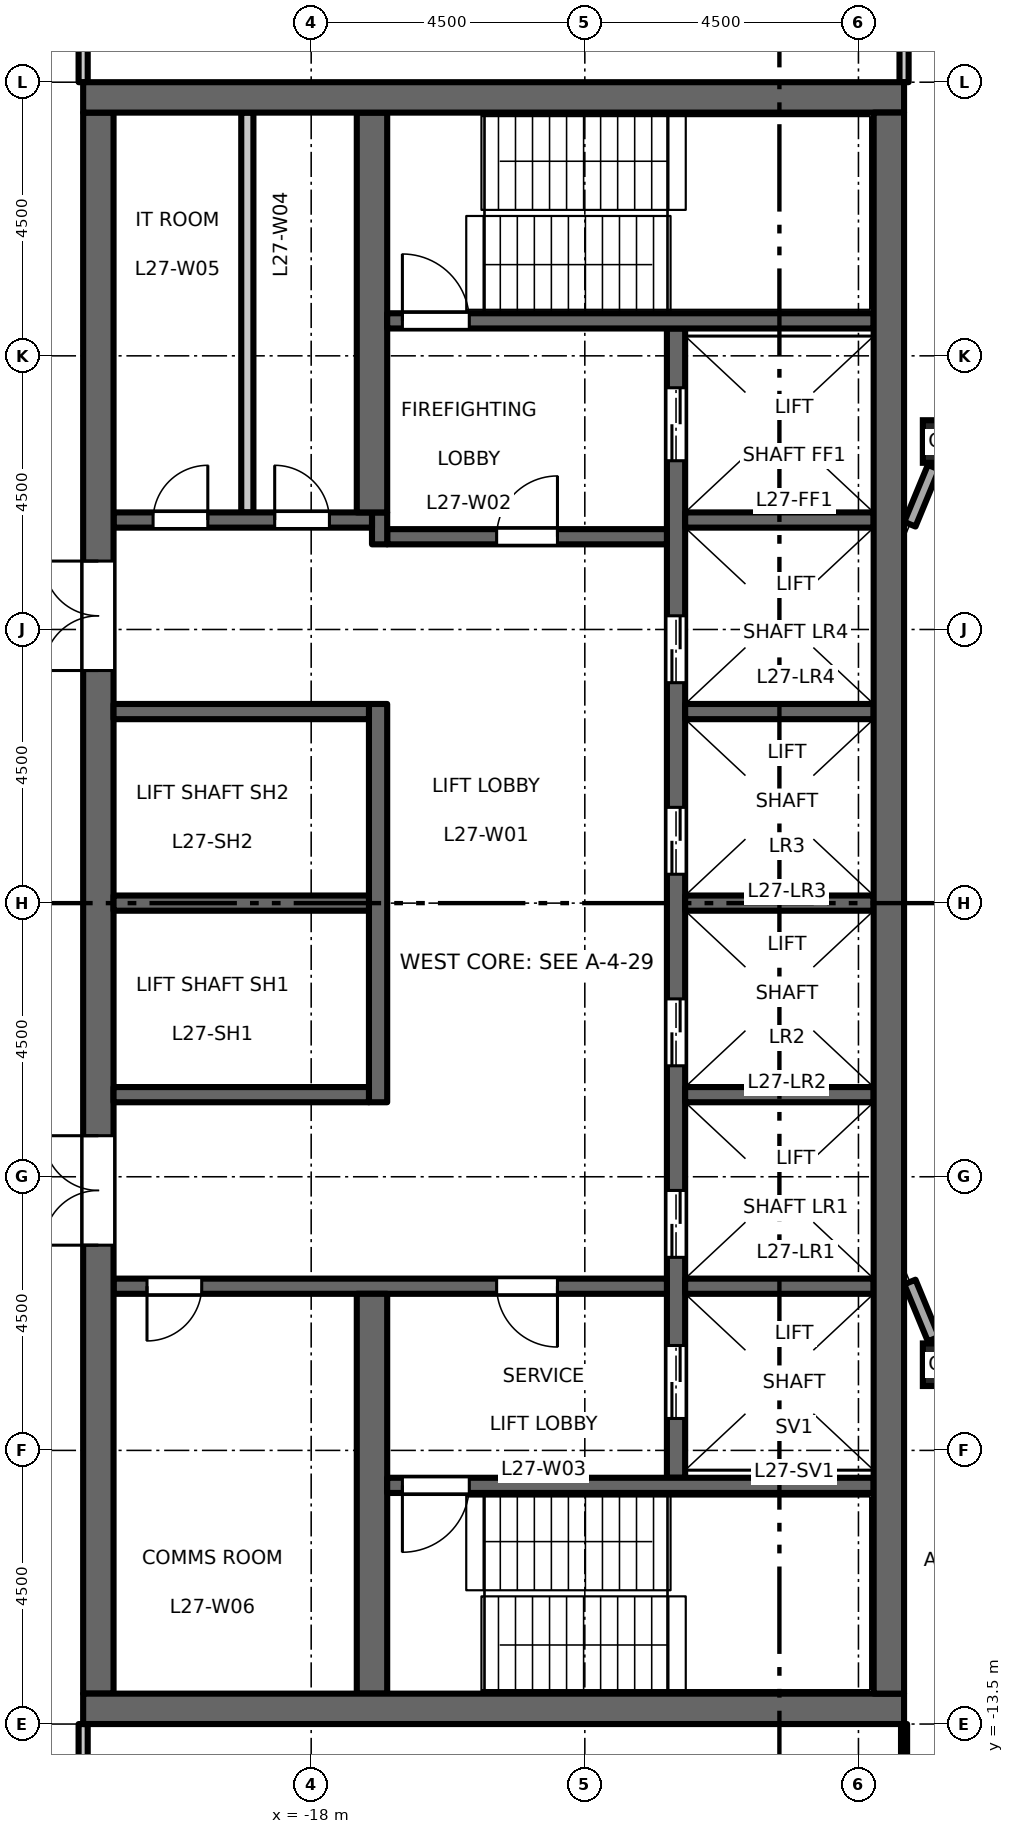
"""IFC4 building model, lengths in metres.
Left out: names, types, materials, properties, quantities, classifications, styles, units other than length and angle.
Written with IfcOpenShell. Run it as: python <this file> out.ifc"""

import sys

from ifc_helpers import new_model, si_unit, direction, frame, frame_2d, origin, origin_2d, place, context, subcontext, project, spatial, rectangle, hollow_rectangle, extrude, element, fill, save


model = new_model("IFC4")
c1 = context("Model", 3, precision=1e-05, world=origin(), true_north=direction((0.0, 1.0)))
c2 = subcontext(c1, "Body", "Model", "MODEL_VIEW")
j1 = project(units=[si_unit("LENGTHUNIT", "METRE"), si_unit("PLANEANGLEUNIT", "RADIAN")], contexts=[c1])
p1 = place(None, origin())
s1 = spatial("IfcSite", under=j1, at=p1, CompositionType="ELEMENT")
p2 = place(p1, origin())
s2 = spatial("IfcBuilding", under=s1, at=p2, CompositionType="ELEMENT")
p3 = place(p2, frame((0.0, 0.0, 127.2)))
s3 = spatial("IfcBuildingStorey", under=s2, at=p3, CompositionType="ELEMENT", Elevation=127.2)
for number, where, z_axis, x_axis in (
    (1, (-7.591, -7.591, 0.0), (0.0, 0.0, 1.0), (1.0, 0.0, 0.0)),
    (2, (-7.591, 7.591, 0.0), (0.0, 0.0, 1.0), (1.0, 0.0, 0.0)),
):
    element("IfcColumn", number, at=place(p3, frame(where, z_axis=z_axis, x_axis=x_axis)), inside=s3, PredefinedType="COLUMN", context=c2, shape_type="SweptSolid", body=[
        extrude(hollow_rectangle(XDim=0.7, YDim=0.7, WallThickness=0.04, at=origin_2d()), origin(), (0.0, 0.0, 1.0), 4.5),
    ])
p4 = place(p3, frame((-12.0, -9.45, 0.0), z_axis=(0.0, 0.0, 1.0), x_axis=(0.0, 1.0, 0.0)))
e3 = element("IfcWall", 3, at=p4, inside=s3, PredefinedType="SHEAR", context=c2, shape_type="SweptSolid", body=[
    extrude(rectangle(XDim=18.9, YDim=0.3, at=frame_2d((9.45, 0.0))), origin(), (0.0, 0.0, 1.0), 4.35),
])
p5 = place(p4, frame((3.625, 0.0, 0.0)))
e4 = element("IfcOpeningElement", 4, at=p5, cuts=e3, PredefinedType="OPENING", context=c2, shape_type="SweptSolid", body=[
    extrude(rectangle(XDim=1.1, YDim=2.1, at=frame_2d((0.55, 1.05))), frame((0.0, 0.16, 0.0), z_axis=(0.0, -1.0, 0.0), x_axis=(1.0, 0.0, 0.0)), (0.0, 0.0, 1.0), 0.32),
])
p6 = place(p4, frame((6.775, 0.0, 0.0)))
e5 = element("IfcOpeningElement", 5, at=p6, cuts=e3, PredefinedType="OPENING", context=c2, shape_type="SweptSolid", body=[
    extrude(rectangle(XDim=1.1, YDim=2.1, at=frame_2d((0.55, 1.05))), frame((0.0, 0.16, 0.0), z_axis=(0.0, -1.0, 0.0), x_axis=(1.0, 0.0, 0.0)), (0.0, 0.0, 1.0), 0.32),
])
p7 = place(p4, frame((9.925, 0.0, 0.0)))
e6 = element("IfcOpeningElement", 6, at=p7, cuts=e3, PredefinedType="OPENING", context=c2, shape_type="SweptSolid", body=[
    extrude(rectangle(XDim=1.1, YDim=2.1, at=frame_2d((0.55, 1.05))), frame((0.0, 0.16, 0.0), z_axis=(0.0, -1.0, 0.0), x_axis=(1.0, 0.0, 0.0)), (0.0, 0.0, 1.0), 0.32),
])
p8 = place(p4, frame((13.075, 0.0, 0.0)))
e7 = element("IfcOpeningElement", 7, at=p8, cuts=e3, PredefinedType="OPENING", context=c2, shape_type="SweptSolid", body=[
    extrude(rectangle(XDim=1.1, YDim=2.1, at=frame_2d((0.55, 1.05))), frame((0.0, 0.16, 0.0), z_axis=(0.0, -1.0, 0.0), x_axis=(1.0, 0.0, 0.0)), (0.0, 0.0, 1.0), 0.32),
])
p9 = place(p4, frame((16.725, 0.0, 0.0)))
e8 = element("IfcOpeningElement", 8, at=p9, cuts=e3, PredefinedType="OPENING", context=c2, shape_type="SweptSolid", body=[
    extrude(rectangle(XDim=1.2, YDim=2.1, at=frame_2d((0.6, 1.05))), frame((0.0, 0.16, 0.0), z_axis=(0.0, -1.0, 0.0), x_axis=(1.0, 0.0, 0.0)), (0.0, 0.0, 1.0), 0.32),
])
p10 = place(p4, frame((0.975, 0.0, 0.0)))
e9 = element("IfcOpeningElement", 9, at=p10, cuts=e3, PredefinedType="OPENING", context=c2, shape_type="SweptSolid", body=[
    extrude(rectangle(XDim=1.2, YDim=2.1, at=frame_2d((0.6, 1.05))), frame((0.0, 0.16, 0.0), z_axis=(0.0, -1.0, 0.0), x_axis=(1.0, 0.0, 0.0)), (0.0, 0.0, 1.0), 0.32),
])
p11 = place(p3, frame((-12.15, 6.025, 0.0), z_axis=(0.0, 0.0, 1.0), x_axis=(-1.0, 0.0, 0.0)))
e10 = element("IfcWall", 10, at=p11, inside=s3, PredefinedType="SHEAR", context=c2, shape_type="SweptSolid", body=[
    extrude(rectangle(XDim=4.6, YDim=0.25, at=frame_2d((2.3, 0.0))), origin(), (0.0, 0.0, 1.0), 4.35),
])
p12 = place(p11, frame((1.8, 0.0, 0.0)))
e11 = element("IfcOpeningElement", 11, at=p12, cuts=e10, PredefinedType="OPENING", context=c2, shape_type="SweptSolid", body=[
    extrude(rectangle(XDim=1.0, YDim=2.1, at=frame_2d((0.5, 1.05))), frame((0.0, 0.135, 0.0), z_axis=(0.0, -1.0, 0.0), x_axis=(1.0, 0.0, 0.0)), (0.0, 0.0, 1.0), 0.27),
])
p13 = place(p3, frame((-16.875, 5.9, 0.0), z_axis=(0.0, 0.0, 1.0), x_axis=(0.0, 1.0, 0.0)))
e12 = element("IfcWall", 12, at=p13, inside=s3, PredefinedType="SHEAR", context=c2, shape_type="SweptSolid", body=[
    extrude(rectangle(XDim=0.525, YDim=0.25, at=frame_2d((0.263, 0.0))), origin(), (0.0, 0.0, 1.0), 4.35),
])
p14 = place(p3, frame((-17.0, 6.3, 0.0), z_axis=(0.0, 0.0, 1.0), x_axis=(-1.0, 0.0, 0.0)))
e13 = element("IfcWall", 13, at=p14, inside=s3, PredefinedType="SHEAR", context=c2, shape_type="SweptSolid", body=[
    extrude(rectangle(XDim=4.25, YDim=0.25, at=frame_2d((2.125, 0.0))), origin(), (0.0, 0.0, 1.0), 4.35),
])
p15 = place(p14, frame((0.7, 0.0, 0.0)))
e14 = element("IfcOpeningElement", 14, at=p15, cuts=e13, PredefinedType="OPENING", context=c2, shape_type="SweptSolid", body=[
    extrude(rectangle(XDim=0.9, YDim=2.1, at=frame_2d((0.45, 1.05))), frame((0.0, 0.135, 0.0), z_axis=(0.0, -1.0, 0.0), x_axis=(1.0, 0.0, 0.0)), (0.0, 0.0, 1.0), 0.27),
])
p16 = place(p14, frame((2.7, 0.0, 0.0)))
e15 = element("IfcOpeningElement", 15, at=p16, cuts=e13, PredefinedType="OPENING", context=c2, shape_type="SweptSolid", body=[
    extrude(rectangle(XDim=0.9, YDim=2.1, at=frame_2d((0.45, 1.05))), frame((0.0, 0.135, 0.0), z_axis=(0.0, -1.0, 0.0), x_axis=(1.0, 0.0, 0.0)), (0.0, 0.0, 1.0), 0.27),
])
p17 = place(p3, frame((-12.15, -6.3, 0.0), z_axis=(0.0, 0.0, 1.0), x_axis=(-1.0, 0.0, 0.0)))
e16 = element("IfcWall", 16, at=p17, inside=s3, PredefinedType="SHEAR", context=c2, shape_type="SweptSolid", body=[
    extrude(rectangle(XDim=9.1, YDim=0.25, at=frame_2d((4.55, 0.0))), origin(), (0.0, 0.0, 1.0), 4.35),
])
p18 = place(p17, frame((1.8, 0.0, 0.0)))
e17 = element("IfcOpeningElement", 17, at=p18, cuts=e16, PredefinedType="OPENING", context=c2, shape_type="SweptSolid", body=[
    extrude(rectangle(XDim=1.0, YDim=2.1, at=frame_2d((0.5, 1.05))), frame((0.0, 0.135, 0.0), z_axis=(0.0, -1.0, 0.0), x_axis=(1.0, 0.0, 0.0)), (0.0, 0.0, 1.0), 0.27),
])
p19 = place(p17, frame((7.65, 0.0, 0.0)))
e18 = element("IfcOpeningElement", 18, at=p19, cuts=e16, PredefinedType="OPENING", context=c2, shape_type="SweptSolid", body=[
    extrude(rectangle(XDim=0.9, YDim=2.1, at=frame_2d((0.45, 1.05))), frame((0.0, 0.135, 0.0), z_axis=(0.0, -1.0, 0.0), x_axis=(1.0, 0.0, 0.0)), (0.0, 0.0, 1.0), 0.27),
])
p20 = place(p3, frame((-21.5, -13.0, 0.0), z_axis=(0.0, 0.0, 1.0), x_axis=(0.0, 1.0, 0.0)))
e19 = element("IfcWall", 19, at=p20, inside=s3, PredefinedType="SHEAR", context=c2, shape_type="SweptSolid", body=[
    extrude(rectangle(XDim=26.0, YDim=0.5, at=frame_2d((13.0, 0.0))), origin(), (0.0, 0.0, 1.0), 4.35),
])
p21 = place(p20, frame((16.825, 0.0, 0.0)))
e20 = element("IfcOpeningElement", 20, at=p21, cuts=e19, PredefinedType="OPENING", context=c2, shape_type="SweptSolid", body=[
    extrude(rectangle(XDim=1.8, YDim=2.1, at=frame_2d((0.9, 1.05))), frame((0.0, 0.26, 0.0), z_axis=(0.0, -1.0, 0.0), x_axis=(1.0, 0.0, 0.0)), (0.0, 0.0, 1.0), 0.52),
])
p22 = place(p20, frame((7.375, 0.0, 0.0)))
e21 = element("IfcOpeningElement", 21, at=p22, cuts=e19, PredefinedType="OPENING", context=c2, shape_type="SweptSolid", body=[
    extrude(rectangle(XDim=1.8, YDim=2.1, at=frame_2d((0.9, 1.05))), frame((0.0, 0.26, 0.0), z_axis=(0.0, -1.0, 0.0), x_axis=(1.0, 0.0, 0.0)), (0.0, 0.0, 1.0), 0.52),
])
p23 = place(p3, frame((-19.05, 6.425, 0.0), z_axis=(0.0, 0.0, 1.0), x_axis=(0.0, 1.0, 0.0)))
e22 = element("IfcWall", 22, at=p23, inside=s3, PredefinedType="PARTITIONING", context=c2, shape_type="SweptSolid", body=[
    extrude(rectangle(XDim=6.575, YDim=0.2, at=frame_2d((3.288, 0.0))), origin(), (0.0, 0.0, 1.0), 4.35),
])
p24 = place(p3, frame((-16.9, -3.275, 0.0), z_axis=(0.0, 0.0, 1.0), x_axis=(0.0, 1.0, 0.0)))
e23 = element("IfcWall", 23, at=p24, inside=s3, PredefinedType="SHEAR", context=c2, shape_type="SweptSolid", body=[
    extrude(rectangle(XDim=6.55, YDim=0.3, at=frame_2d((3.275, 0.0))), origin(), (0.0, 0.0, 1.0), 4.35),
])
for number, where, z_axis, x_axis in (
    (24, (-17.05, 0.0, 0.0), (0.0, 0.0, 1.0), (-1.0, 0.0, 0.0)),
    (25, (-17.05, 3.15, 0.0), (0.0, 0.0, 1.0), (-1.0, 0.0, 0.0)),
    (26, (-17.05, -3.15, 0.0), (0.0, 0.0, 1.0), (-1.0, 0.0, 0.0)),
):
    element("IfcWall", number, at=place(p3, frame(where, z_axis=z_axis, x_axis=x_axis)), inside=s3, PredefinedType="SHEAR", context=c2, shape_type="SweptSolid", body=[
        extrude(rectangle(XDim=4.2, YDim=0.25, at=frame_2d((2.1, 0.0))), origin(), (0.0, 0.0, 1.0), 4.35),
    ])
for number, where, z_axis, x_axis in (
    (27, (-17.0, 6.425, 0.0), (0.0, 0.0, 1.0), (0.0, 1.0, 0.0)),
    (28, (-17.0, -13.0, 0.0), (0.0, 0.0, 1.0), (0.0, 1.0, 0.0)),
):
    element("IfcWall", number, at=place(p3, frame(where, z_axis=z_axis, x_axis=x_axis)), inside=s3, PredefinedType="SHEAR", context=c2, shape_type="SweptSolid", body=[
        extrude(rectangle(XDim=6.575, YDim=0.5, at=frame_2d((3.288, 0.0))), origin(), (0.0, 0.0, 1.0), 4.35),
    ])
for number, where, z_axis, x_axis in (
    (29, (-8.75, 0.0, 0.0), (0.0, 0.0, 1.0), (-1.0, 0.0, 0.0)),
    (30, (-8.75, 3.15, 0.0), (0.0, 0.0, 1.0), (-1.0, 0.0, 0.0)),
    (31, (-8.75, 6.3, 0.0), (0.0, 0.0, 1.0), (-1.0, 0.0, 0.0)),
    (32, (-8.75, -3.15, 0.0), (0.0, 0.0, 1.0), (-1.0, 0.0, 0.0)),
    (33, (-8.75, -6.3, 0.0), (0.0, 0.0, 1.0), (-1.0, 0.0, 0.0)),
):
    element("IfcWall", number, at=place(p3, frame(where, z_axis=z_axis, x_axis=x_axis)), inside=s3, PredefinedType="SHEAR", context=c2, shape_type="SweptSolid", body=[
        extrude(rectangle(XDim=3.1, YDim=0.25, at=frame_2d((1.55, 0.0))), origin(), (0.0, 0.0, 1.0), 4.35),
    ])
p25 = place(p3, frame((-8.75, 9.575, 0.0), z_axis=(0.0, 0.0, 1.0), x_axis=(-1.0, 0.0, 0.0)))
e34 = element("IfcWall", 34, at=p25, inside=s3, PredefinedType="SHEAR", context=c2, shape_type="SweptSolid", body=[
    extrude(rectangle(XDim=8.0, YDim=0.25, at=frame_2d((4.0, 0.0))), origin(), (0.0, 0.0, 1.0), 4.35),
])
p26 = place(p25, frame((6.65, 0.0, 0.0)))
e35 = element("IfcOpeningElement", 35, at=p26, cuts=e34, PredefinedType="OPENING", context=c2, shape_type="SweptSolid", body=[
    extrude(rectangle(XDim=1.1, YDim=2.1, at=frame_2d((0.55, 1.05))), frame((0.0, 0.135, 0.0), z_axis=(0.0, -1.0, 0.0), x_axis=(1.0, 0.0, 0.0)), (0.0, 0.0, 1.0), 0.27),
])
p27 = place(p3, frame((-8.75, -9.575, 0.0), z_axis=(0.0, 0.0, 1.0), x_axis=(-1.0, 0.0, 0.0)))
e36 = element("IfcWall", 36, at=p27, inside=s3, PredefinedType="SHEAR", context=c2, shape_type="SweptSolid", body=[
    extrude(rectangle(XDim=8.0, YDim=0.25, at=frame_2d((4.0, 0.0))), origin(), (0.0, 0.0, 1.0), 4.35),
])
p28 = place(p27, frame((6.65, 0.0, 0.0)))
e37 = element("IfcOpeningElement", 37, at=p28, cuts=e36, PredefinedType="OPENING", context=c2, shape_type="SweptSolid", body=[
    extrude(rectangle(XDim=1.1, YDim=2.1, at=frame_2d((0.55, 1.05))), frame((0.0, 0.135, 0.0), z_axis=(0.0, -1.0, 0.0), x_axis=(1.0, 0.0, 0.0)), (0.0, 0.0, 1.0), 0.27),
])
for number, where, z_axis, x_axis in (
    (38, (-8.25, 13.25, 0.0), (0.0, 0.0, 1.0), (-1.0, 0.0, 0.0)),
    (39, (-8.25, -13.25, 0.0), (0.0, 0.0, 1.0), (-1.0, 0.0, 0.0)),
):
    element("IfcWall", number, at=place(p3, frame(where, z_axis=z_axis, x_axis=x_axis)), inside=s3, PredefinedType="SHEAR", context=c2, shape_type="SweptSolid", body=[
        extrude(rectangle(XDim=13.5, YDim=0.5, at=frame_2d((6.75, 0.0))), origin(), (0.0, 0.0, 1.0), 4.35),
    ])
p29 = place(p3, frame((-8.5, -13.0, 0.0), z_axis=(0.0, 0.0, 1.0), x_axis=(0.0, 1.0, 0.0)))
e40 = element("IfcWall", 40, at=p29, inside=s3, PredefinedType="SHEAR", context=c2, shape_type="SweptSolid", body=[
    extrude(rectangle(XDim=26.0, YDim=0.5, at=frame_2d((13.0, 0.0))), origin(), (0.0, 0.0, 1.0), 4.35),
])
for number, where, z_axis, x_axis in (
    (41, (-7.766, 7.168, 0.0), (0.0, 0.0, 1.0), (-0.383, -0.924, 0.0)),
    (42, (-8.154, -6.231, 0.0), (0.0, 0.0, 1.0), (0.383, -0.924, 0.0)),
):
    element("IfcWall", number, at=place(p3, frame(where, z_axis=z_axis, x_axis=x_axis)), inside=s3, PredefinedType="STANDARD", context=c2, shape_type="SweptSolid", body=[
        extrude(rectangle(XDim=1.015, YDim=0.2, at=frame_2d((0.507, 0.0))), origin(), (0.0, 0.0, 1.0), 3.826),
    ])
for number, where, z_axis, x_axis in (
    (43, (-21.75, -17.925, 0.0), (0.0, 0.0, 1.0), (0.0, 1.0, 0.0)),
    (44, (-21.75, 13.5, 0.0), (0.0, 0.0, 1.0), (0.0, 1.0, 0.0)),
):
    element("IfcWall", number, at=place(p3, frame(where, z_axis=z_axis, x_axis=x_axis)), inside=s3, PredefinedType="PARTITIONING", context=c2, shape_type="SweptSolid", body=[
        extrude(rectangle(XDim=4.425, YDim=0.15, at=frame_2d((2.212, 0.0))), origin(), (0.0, 0.0, 1.0), 4.35),
    ])
p30 = place(p3, frame((-8.25, -17.925, 0.0), z_axis=(0.0, 0.0, 1.0), x_axis=(0.0, 1.0, 0.0)))
e45 = element("IfcWall", 45, at=p30, inside=s3, PredefinedType="PARTITIONING", context=c2, shape_type="SweptSolid", body=[
    extrude(rectangle(XDim=4.425, YDim=0.1, at=frame_2d((2.212, 0.0))), origin(), (0.0, 0.0, 1.0), 4.35),
])
p31 = place(p3, frame((-8.25, 13.5, 0.0), z_axis=(0.0, 0.0, 1.0), x_axis=(0.0, 1.0, 0.0)))
e46 = element("IfcWall", 46, at=p31, inside=s3, PredefinedType="PARTITIONING", context=c2, shape_type="SweptSolid", body=[
    extrude(rectangle(XDim=4.425, YDim=0.15, at=frame_2d((2.212, 0.0))), origin(), (0.0, 0.0, 1.0), 4.35),
])
p32 = place(p12, origin())
e47 = element("IfcDoor", 47, at=p32, inside=s3, OperationType="SINGLE_SWING_LEFT", PredefinedType="DOOR", context=c2, shape_type="SweptSolid", body=[
    extrude(rectangle(XDim=1.0, YDim=2.1, at=frame_2d((0.5, 1.05))), frame((0.0, 0.025, 0.0), z_axis=(0.0, -1.0, 0.0), x_axis=(1.0, 0.0, 0.0)), (0.0, 0.0, 1.0), 0.05),
])
fill(e11, e47)
p33 = place(p18, origin())
e48 = element("IfcDoor", 48, at=p33, inside=s3, OperationType="SINGLE_SWING_RIGHT", PredefinedType="DOOR", context=c2, shape_type="SweptSolid", body=[
    extrude(rectangle(XDim=1.0, YDim=2.1, at=frame_2d((0.5, 1.05))), frame((0.0, 0.025, 0.0), z_axis=(0.0, -1.0, 0.0), x_axis=(1.0, 0.0, 0.0)), (0.0, 0.0, 1.0), 0.05),
])
fill(e17, e48)
p34 = place(p26, origin())
e49 = element("IfcDoor", 49, at=p34, inside=s3, OperationType="SINGLE_SWING_RIGHT", PredefinedType="DOOR", context=c2, shape_type="SweptSolid", body=[
    extrude(rectangle(XDim=1.1, YDim=2.1, at=frame_2d((0.55, 1.05))), frame((0.0, 0.025, 0.0), z_axis=(0.0, -1.0, 0.0), x_axis=(1.0, 0.0, 0.0)), (0.0, 0.0, 1.0), 0.05),
])
fill(e35, e49)
p35 = place(p28, origin())
e50 = element("IfcDoor", 50, at=p35, inside=s3, OperationType="SINGLE_SWING_LEFT", PredefinedType="DOOR", context=c2, shape_type="SweptSolid", body=[
    extrude(rectangle(XDim=1.1, YDim=2.1, at=frame_2d((0.55, 1.05))), frame((0.0, 0.025, 0.0), z_axis=(0.0, -1.0, 0.0), x_axis=(1.0, 0.0, 0.0)), (0.0, 0.0, 1.0), 0.05),
])
fill(e37, e50)
p36 = place(p21, origin())
e51 = element("IfcDoor", 51, at=p36, inside=s3, OperationType="DOUBLE_DOOR_DOUBLE_SWING", PredefinedType="DOOR", context=c2, shape_type="SweptSolid", body=[
    extrude(rectangle(XDim=1.8, YDim=2.1, at=frame_2d((0.9, 1.05))), frame((0.0, 0.025, 0.0), z_axis=(0.0, -1.0, 0.0), x_axis=(1.0, 0.0, 0.0)), (0.0, 0.0, 1.0), 0.05),
])
fill(e20, e51)
p37 = place(p22, origin())
e52 = element("IfcDoor", 52, at=p37, inside=s3, OperationType="DOUBLE_DOOR_DOUBLE_SWING", PredefinedType="DOOR", context=c2, shape_type="SweptSolid", body=[
    extrude(rectangle(XDim=1.8, YDim=2.1, at=frame_2d((0.9, 1.05))), frame((0.0, 0.025, 0.0), z_axis=(0.0, -1.0, 0.0), x_axis=(1.0, 0.0, 0.0)), (0.0, 0.0, 1.0), 0.05),
])
fill(e21, e52)
p38 = place(p5, origin())
e53 = element("IfcDoor", 53, at=p38, inside=s3, OperationType="DOUBLE_DOOR_SLIDING", PredefinedType="DOOR", context=c2, shape_type="SweptSolid", body=[
    extrude(rectangle(XDim=1.1, YDim=2.1, at=frame_2d((0.55, 1.05))), frame((0.0, 0.025, 0.0), z_axis=(0.0, -1.0, 0.0), x_axis=(1.0, 0.0, 0.0)), (0.0, 0.0, 1.0), 0.05),
])
fill(e4, e53)
p39 = place(p6, origin())
e54 = element("IfcDoor", 54, at=p39, inside=s3, OperationType="DOUBLE_DOOR_SLIDING", PredefinedType="DOOR", context=c2, shape_type="SweptSolid", body=[
    extrude(rectangle(XDim=1.1, YDim=2.1, at=frame_2d((0.55, 1.05))), frame((0.0, 0.025, 0.0), z_axis=(0.0, -1.0, 0.0), x_axis=(1.0, 0.0, 0.0)), (0.0, 0.0, 1.0), 0.05),
])
fill(e5, e54)
p40 = place(p7, origin())
e55 = element("IfcDoor", 55, at=p40, inside=s3, OperationType="DOUBLE_DOOR_SLIDING", PredefinedType="DOOR", context=c2, shape_type="SweptSolid", body=[
    extrude(rectangle(XDim=1.1, YDim=2.1, at=frame_2d((0.55, 1.05))), frame((0.0, 0.025, 0.0), z_axis=(0.0, -1.0, 0.0), x_axis=(1.0, 0.0, 0.0)), (0.0, 0.0, 1.0), 0.05),
])
fill(e6, e55)
p41 = place(p8, origin())
e56 = element("IfcDoor", 56, at=p41, inside=s3, OperationType="DOUBLE_DOOR_SLIDING", PredefinedType="DOOR", context=c2, shape_type="SweptSolid", body=[
    extrude(rectangle(XDim=1.1, YDim=2.1, at=frame_2d((0.55, 1.05))), frame((0.0, 0.025, 0.0), z_axis=(0.0, -1.0, 0.0), x_axis=(1.0, 0.0, 0.0)), (0.0, 0.0, 1.0), 0.05),
])
fill(e7, e56)
p42 = place(p9, origin())
e57 = element("IfcDoor", 57, at=p42, inside=s3, OperationType="DOUBLE_DOOR_SLIDING", PredefinedType="DOOR", context=c2, shape_type="SweptSolid", body=[
    extrude(rectangle(XDim=1.2, YDim=2.1, at=frame_2d((0.6, 1.05))), frame((0.0, 0.025, 0.0), z_axis=(0.0, -1.0, 0.0), x_axis=(1.0, 0.0, 0.0)), (0.0, 0.0, 1.0), 0.05),
])
fill(e8, e57)
p43 = place(p10, origin())
e58 = element("IfcDoor", 58, at=p43, inside=s3, OperationType="DOUBLE_DOOR_SLIDING", PredefinedType="DOOR", context=c2, shape_type="SweptSolid", body=[
    extrude(rectangle(XDim=1.2, YDim=2.1, at=frame_2d((0.6, 1.05))), frame((0.0, 0.025, 0.0), z_axis=(0.0, -1.0, 0.0), x_axis=(1.0, 0.0, 0.0)), (0.0, 0.0, 1.0), 0.05),
])
fill(e9, e58)
p44 = place(p15, origin())
e59 = element("IfcDoor", 59, at=p44, inside=s3, OperationType="SINGLE_SWING_RIGHT", PredefinedType="DOOR", context=c2, shape_type="SweptSolid", body=[
    extrude(rectangle(XDim=0.9, YDim=2.1, at=frame_2d((0.45, 1.05))), frame((0.0, 0.025, 0.0), z_axis=(0.0, -1.0, 0.0), x_axis=(1.0, 0.0, 0.0)), (0.0, 0.0, 1.0), 0.05),
])
fill(e14, e59)
p45 = place(p16, origin())
e60 = element("IfcDoor", 60, at=p45, inside=s3, OperationType="SINGLE_SWING_LEFT", PredefinedType="DOOR", context=c2, shape_type="SweptSolid", body=[
    extrude(rectangle(XDim=0.9, YDim=2.1, at=frame_2d((0.45, 1.05))), frame((0.0, 0.025, 0.0), z_axis=(0.0, -1.0, 0.0), x_axis=(1.0, 0.0, 0.0)), (0.0, 0.0, 1.0), 0.05),
])
fill(e15, e60)
p46 = place(p19, origin())
e61 = element("IfcDoor", 61, at=p46, inside=s3, OperationType="SINGLE_SWING_LEFT", PredefinedType="DOOR", context=c2, shape_type="SweptSolid", body=[
    extrude(rectangle(XDim=0.9, YDim=2.1, at=frame_2d((0.45, 1.05))), frame((0.0, 0.025, 0.0), z_axis=(0.0, -1.0, 0.0), x_axis=(1.0, 0.0, 0.0)), (0.0, 0.0, 1.0), 0.05),
])
fill(e18, e61)
save(model, sys.argv[1])
